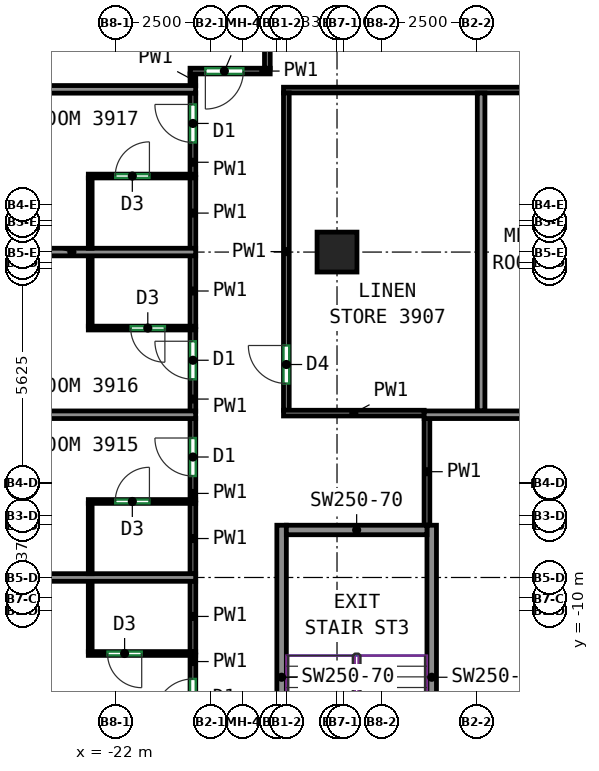
"""IFC4 building model, lengths in metres.
Left out: names, types, materials, properties, quantities, classifications, styles, units other than length and angle.
Written with IfcOpenShell. Run it as: python <this file> out.ifc"""

import sys

from ifc_helpers import new_model, si_unit, direction, frame, frame_2d, origin, origin_2d, place, context, subcontext, project, spatial, rectangle, extrude, source, transform, mapped, element, fill, save


model = new_model("IFC4")
c1 = context("Model", 3, precision=1e-05, world=origin(), true_north=direction((0.0, 1.0)))
c2 = subcontext(c1, "Body", "Model", "MODEL_VIEW")
j1 = project(units=[si_unit("LENGTHUNIT", "METRE"), si_unit("PLANEANGLEUNIT", "RADIAN")], contexts=[c1])
p1 = place(None, origin())
s1 = spatial("IfcSite", under=j1, at=p1, CompositionType="ELEMENT")
p2 = place(p1, origin())
s2 = spatial("IfcBuilding", under=s1, at=p2, CompositionType="ELEMENT")
p3 = place(p2, frame((0.0, 0.0, 168.5)))
s3 = spatial("IfcBuildingStorey", under=s2, at=p3, CompositionType="ELEMENT", Elevation=168.5)
m1 = source(origin(), c2, "Body", "SweptSolid", [
    extrude(rectangle(XDim=1.05, YDim=1.05, at=origin_2d()), origin(), (0.0, 0.0, 1.0), 3.12),
])
p4 = place(p3, frame((-16.167, -0.562, 0.0), z_axis=(0.0, 0.0, 1.0), x_axis=(1.0, 0.0, 0.0)))
e1 = element("IfcColumn", 1, at=p4, inside=s3, PredefinedType="COLUMN", context=c2, shape_type="MappedRepresentation", body=[
    mapped(m1, transform((0.0, 0.0, 0.0))),
])
m2 = source(origin(), c2, "Body", "SweptSolid", [
    extrude(rectangle(XDim=8.0, YDim=0.25, at=frame_2d((4.0, 0.0))), origin(), (0.0, 0.0, 1.0), 3.12),
])
for number, where, z_axis, x_axis in (
    (2, (-17.625, -15.75, 0.0), (0.0, 0.0, 1.0), (0.0, 1.0, 0.0)),
    (3, (-13.675, -15.75, 0.0), (0.0, 0.0, 1.0), (0.0, 1.0, 0.0)),
):
    element("IfcWall", number, at=place(p3, frame(where, z_axis=z_axis, x_axis=x_axis)), inside=s3, PredefinedType="SHEAR", context=c2, shape_type="MappedRepresentation", body=[
        mapped(m2, transform((0.0, 0.0, 0.0))),
    ])
m3 = source(origin(), c2, "Body", "SweptSolid", [
    extrude(rectangle(XDim=3.7, YDim=0.25, at=frame_2d((1.85, 0.0))), origin(), (0.0, 0.0, 1.0), 3.12),
])
p5 = place(p3, frame((-17.5, -7.875, 0.0), z_axis=(0.0, 0.0, 1.0), x_axis=(1.0, 0.0, 0.0)))
e4 = element("IfcWall", 4, at=p5, inside=s3, PredefinedType="SHEAR", context=c2, shape_type="MappedRepresentation", body=[
    mapped(m3, transform((0.0, 0.0, 0.0))),
])
p6 = place(p3, frame((-19.959, -13.316, 0.0), z_axis=(0.0, 0.0, 1.0), x_axis=(0.0, 1.0, 0.0)))
e5 = element("IfcWall", 5, at=p6, inside=s3, PredefinedType="PARTITIONING", context=c2, shape_type="SweptSolid", body=[
    extrude(rectangle(XDim=2.151, YDim=0.15, at=frame_2d((1.075, 0.0))), origin(), (0.0, 0.0, 1.0), 3.12),
])
p7 = place(p6, frame((0.522, 0.0, 0.0)))
e6 = element("IfcOpeningElement", 6, at=p7, cuts=e5, PredefinedType="OPENING", context=c2, shape_type="SweptSolid", body=[
    extrude(rectangle(XDim=1.0, YDim=2.1, at=frame_2d((0.5, 1.05))), frame((0.0, 0.085, 0.0), z_axis=(0.0, -1.0, 0.0), x_axis=(1.0, 0.0, 0.0)), (0.0, 0.0, 1.0), 0.17),
])
p8 = place(p3, frame((-19.959, -11.085, 0.0), z_axis=(0.0, 0.0, 1.0), x_axis=(0.0, 1.0, 0.0)))
e7 = element("IfcWall", 7, at=p8, inside=s3, PredefinedType="PARTITIONING", context=c2, shape_type="SweptSolid", body=[
    extrude(rectangle(XDim=1.87, YDim=0.15, at=frame_2d((0.935, 0.0))), origin(), (0.0, 0.0, 1.0), 3.12),
])
p9 = place(p3, frame((-19.959, -7.085, 0.0), z_axis=(0.0, 0.0, 1.0), x_axis=(0.0, 1.0, 0.0)))
e8 = element("IfcWall", 8, at=p9, inside=s3, PredefinedType="PARTITIONING", context=c2, shape_type="SweptSolid", body=[
    extrude(rectangle(XDim=2.152, YDim=0.15, at=frame_2d((1.076, 0.0))), origin(), (0.0, 0.0, 1.0), 3.12),
])
p10 = place(p9, frame((0.63, 0.0, 0.0)))
e9 = element("IfcOpeningElement", 9, at=p10, cuts=e8, PredefinedType="OPENING", context=c2, shape_type="SweptSolid", body=[
    extrude(rectangle(XDim=1.0, YDim=2.1, at=frame_2d((0.5, 1.05))), frame((0.0, 0.085, 0.0), z_axis=(0.0, -1.0, 0.0), x_axis=(1.0, 0.0, 0.0)), (0.0, 0.0, 1.0), 0.17),
])
p11 = place(p3, frame((-19.959, -9.035, 0.0), z_axis=(0.0, 0.0, 1.0), x_axis=(0.0, 1.0, 0.0)))
e10 = element("IfcWall", 10, at=p11, inside=s3, PredefinedType="PARTITIONING", context=c2, shape_type="SweptSolid", body=[
    extrude(rectangle(XDim=1.87, YDim=0.15, at=frame_2d((0.935, 0.0))), origin(), (0.0, 0.0, 1.0), 3.12),
])
p12 = place(p3, frame((-19.959, -4.753, 0.0), z_axis=(0.0, 0.0, 1.0), x_axis=(0.0, 1.0, 0.0)))
e11 = element("IfcWall", 11, at=p12, inside=s3, PredefinedType="PARTITIONING", context=c2, shape_type="SweptSolid", body=[
    extrude(rectangle(XDim=2.151, YDim=0.15, at=frame_2d((1.075, 0.0))), origin(), (0.0, 0.0, 1.0), 3.12),
])
p13 = place(p12, frame((0.844, 0.0, 0.0)))
e12 = element("IfcOpeningElement", 12, at=p13, cuts=e11, PredefinedType="OPENING", context=c2, shape_type="SweptSolid", body=[
    extrude(rectangle(XDim=1.0, YDim=2.1, at=frame_2d((0.5, 1.05))), frame((0.0, 0.085, 0.0), z_axis=(0.0, -1.0, 0.0), x_axis=(1.0, 0.0, 0.0)), (0.0, 0.0, 1.0), 0.17),
])
p14 = place(p3, frame((-19.959, -2.522, 0.0), z_axis=(0.0, 0.0, 1.0), x_axis=(0.0, 1.0, 0.0)))
e13 = element("IfcWall", 13, at=p14, inside=s3, PredefinedType="PARTITIONING", context=c2, shape_type="SweptSolid", body=[
    extrude(rectangle(XDim=1.87, YDim=0.15, at=frame_2d((0.935, 0.0))), origin(), (0.0, 0.0, 1.0), 3.12),
])
p15 = place(p3, frame((-19.959, 1.478, 0.0), z_axis=(0.0, 0.0, 1.0), x_axis=(0.0, 1.0, 0.0)))
e14 = element("IfcWall", 14, at=p15, inside=s3, PredefinedType="PARTITIONING", context=c2, shape_type="SweptSolid", body=[
    extrude(rectangle(XDim=2.151, YDim=0.15, at=frame_2d((1.075, 0.0))), origin(), (0.0, 0.0, 1.0), 3.12),
])
p16 = place(p15, frame((0.844, 0.0, 0.0)))
e15 = element("IfcOpeningElement", 15, at=p16, cuts=e14, PredefinedType="OPENING", context=c2, shape_type="SweptSolid", body=[
    extrude(rectangle(XDim=1.0, YDim=2.1, at=frame_2d((0.5, 1.05))), frame((0.0, 0.085, 0.0), z_axis=(0.0, -1.0, 0.0), x_axis=(1.0, 0.0, 0.0)), (0.0, 0.0, 1.0), 0.17),
])
p17 = place(p3, frame((-19.959, -0.472, 0.0), z_axis=(0.0, 0.0, 1.0), x_axis=(0.0, 1.0, 0.0)))
e16 = element("IfcWall", 16, at=p17, inside=s3, PredefinedType="PARTITIONING", context=c2, shape_type="SweptSolid", body=[
    extrude(rectangle(XDim=1.87, YDim=0.15, at=frame_2d((0.935, 0.0))), origin(), (0.0, 0.0, 1.0), 3.12),
])
p18 = place(p3, frame((-19.959, 3.809, 0.0), z_axis=(0.0, 0.0, 1.0), x_axis=(0.0, 1.0, 0.0)))
e17 = element("IfcWall", 17, at=p18, inside=s3, PredefinedType="PARTITIONING", context=c2, shape_type="SweptSolid", body=[
    extrude(rectangle(XDim=0.316, YDim=0.15, at=frame_2d((0.158, 0.0))), origin(), (0.0, 0.0, 1.0), 3.12),
])
p19 = place(p3, frame((-17.925, 4.2, 0.0), z_axis=(0.0, 0.0, 1.0), x_axis=(-1.0, 0.0, 0.0)))
e18 = element("IfcWall", 18, at=p19, inside=s3, PredefinedType="PARTITIONING", context=c2, shape_type="SweptSolid", body=[
    extrude(rectangle(XDim=2.109, YDim=0.15, at=frame_2d((1.054, 0.0))), origin(), (0.0, 0.0, 1.0), 3.12),
])
p20 = place(p19, frame((0.706, 0.0, 0.0)))
e19 = element("IfcOpeningElement", 19, at=p20, cuts=e18, PredefinedType="OPENING", context=c2, shape_type="SweptSolid", body=[
    extrude(rectangle(XDim=1.0, YDim=2.1, at=frame_2d((0.5, 1.05))), frame((0.0, 0.085, 0.0), z_axis=(0.0, -1.0, 0.0), x_axis=(1.0, 0.0, 0.0)), (0.0, 0.0, 1.0), 0.17),
])
p21 = place(p3, frame((-18.0, 4.275, 0.0), z_axis=(0.0, 0.0, 1.0), x_axis=(0.0, 1.0, 0.0)))
e20 = element("IfcWall", 20, at=p21, inside=s3, PredefinedType="PARTITIONING", context=c2, shape_type="SweptSolid", body=[
    extrude(rectangle(XDim=1.685, YDim=0.15, at=frame_2d((0.843, 0.0))), origin(), (0.0, 0.0, 1.0), 3.12),
])
p22 = place(p3, frame((-17.575, 3.7, 0.0), z_axis=(0.0, 0.0, 1.0), x_axis=(1.0, 0.0, 0.0)))
e21 = element("IfcWall", 21, at=p22, inside=s3, PredefinedType="PARTITIONING", context=c2, shape_type="SweptSolid", body=[
    extrude(rectangle(XDim=33.85, YDim=0.15, at=frame_2d((16.925, 0.0))), origin(), (0.0, 0.0, 1.0), 3.12),
])
p23 = place(p22, frame((6.596, 0.0, 0.0)))
e22 = element("IfcOpeningElement", 22, at=p23, cuts=e21, PredefinedType="OPENING", context=c2, shape_type="SweptSolid", body=[
    extrude(rectangle(XDim=0.9, YDim=2.1, at=frame_2d((0.45, 1.05))), frame((0.0, 0.085, 0.0), z_axis=(0.0, -1.0, 0.0), x_axis=(1.0, 0.0, 0.0)), (0.0, 0.0, 1.0), 0.17),
])
p24 = place(p22, frame((10.082, 0.0, 0.0)))
e23 = element("IfcOpeningElement", 23, at=p24, cuts=e21, PredefinedType="OPENING", context=c2, shape_type="SweptSolid", body=[
    extrude(rectangle(XDim=0.9, YDim=2.1, at=frame_2d((0.45, 1.05))), frame((0.0, 0.085, 0.0), z_axis=(0.0, -1.0, 0.0), x_axis=(1.0, 0.0, 0.0)), (0.0, 0.0, 1.0), 0.17),
])
p25 = place(p22, frame((21.767, 0.0, 0.0)))
e24 = element("IfcOpeningElement", 24, at=p25, cuts=e21, PredefinedType="OPENING", context=c2, shape_type="SweptSolid", body=[
    extrude(rectangle(XDim=0.9, YDim=2.1, at=frame_2d((0.45, 1.05))), frame((0.0, 0.085, 0.0), z_axis=(0.0, -1.0, 0.0), x_axis=(1.0, 0.0, 0.0)), (0.0, 0.0, 1.0), 0.17),
])
p26 = place(p22, frame((29.649, 0.0, 0.0)))
e25 = element("IfcOpeningElement", 25, at=p26, cuts=e21, PredefinedType="OPENING", context=c2, shape_type="SweptSolid", body=[
    extrude(rectangle(XDim=0.9, YDim=2.1, at=frame_2d((0.45, 1.05))), frame((0.0, 0.085, 0.0), z_axis=(0.0, -1.0, 0.0), x_axis=(1.0, 0.0, 0.0)), (0.0, 0.0, 1.0), 0.17),
])
p27 = place(p3, frame((-17.5, -4.725, 0.0), z_axis=(0.0, 0.0, 1.0), x_axis=(0.0, 1.0, 0.0)))
e26 = element("IfcWall", 26, at=p27, inside=s3, PredefinedType="PARTITIONING", context=c2, shape_type="SweptSolid", body=[
    extrude(rectangle(XDim=8.35, YDim=0.15, at=frame_2d((4.175, 0.0))), origin(), (0.0, 0.0, 1.0), 3.12),
])
p28 = place(p27, frame((0.704, 0.0, 0.0)))
e27 = element("IfcOpeningElement", 27, at=p28, cuts=e26, PredefinedType="OPENING", context=c2, shape_type="SweptSolid", body=[
    extrude(rectangle(XDim=1.0, YDim=2.1, at=frame_2d((0.5, 1.05))), frame((0.0, 0.085, 0.0), z_axis=(0.0, -1.0, 0.0), x_axis=(1.0, 0.0, 0.0)), (0.0, 0.0, 1.0), 0.17),
])
p29 = place(p3, frame((-17.575, -4.8, 0.0), z_axis=(0.0, 0.0, 1.0), x_axis=(1.0, 0.0, 0.0)))
e28 = element("IfcWall", 28, at=p29, inside=s3, PredefinedType="PARTITIONING", context=c2, shape_type="SweptSolid", body=[
    extrude(rectangle(XDim=3.702, YDim=0.15, at=frame_2d((1.851, 0.0))), origin(), (0.0, 0.0, 1.0), 3.12),
])
p30 = place(p3, frame((-13.8, -7.75, 0.0), z_axis=(0.0, 0.0, 1.0), x_axis=(0.0, 1.0, 0.0)))
e29 = element("IfcWall", 29, at=p30, inside=s3, PredefinedType="PARTITIONING", context=c2, shape_type="SweptSolid", body=[
    extrude(rectangle(XDim=2.817, YDim=0.15, at=frame_2d((1.408, 0.0))), origin(), (0.0, 0.0, 1.0), 3.12),
])
p31 = place(p3, frame((-19.886, -11.125, 0.0), z_axis=(0.0, 0.0, 1.0), x_axis=(-1.0, 0.0, 0.0)))
e30 = element("IfcWall", 30, at=p31, inside=s3, PredefinedType="PARTITIONING", context=c2, shape_type="SweptSolid", body=[
    extrude(rectangle(XDim=2.825, YDim=0.1, at=frame_2d((1.413, 0.0))), origin(), (0.0, 0.0, 1.0), 3.12),
])
p32 = place(p31, frame((1.42, 0.0, 0.0)))
e31 = element("IfcOpeningElement", 31, at=p32, cuts=e30, PredefinedType="OPENING", context=c2, shape_type="SweptSolid", body=[
    extrude(rectangle(XDim=0.9, YDim=2.1, at=frame_2d((0.45, 1.05))), frame((0.0, 0.06, 0.0), z_axis=(0.0, -1.0, 0.0), x_axis=(1.0, 0.0, 0.0)), (0.0, 0.0, 1.0), 0.12),
])
p33 = place(p3, frame((-22.661, -11.075, 0.0), z_axis=(0.0, 0.0, 1.0), x_axis=(0.0, 1.0, 0.0)))
e32 = element("IfcWall", 32, at=p33, inside=s3, PredefinedType="PARTITIONING", context=c2, shape_type="SweptSolid", body=[
    extrude(rectangle(XDim=1.85, YDim=0.1, at=frame_2d((0.925, 0.0))), origin(), (0.0, 0.0, 1.0), 3.12),
])
p34 = place(p3, frame((-26.4, -9.125, 0.0), z_axis=(0.0, 0.0, 1.0), x_axis=(1.0, 0.0, 0.0)))
e33 = element("IfcWall", 33, at=p34, inside=s3, PredefinedType="PARTITIONING", context=c2, shape_type="SweptSolid", body=[
    extrude(rectangle(XDim=6.514, YDim=0.2, at=frame_2d((3.257, 0.0))), origin(), (0.0, 0.0, 1.0), 3.12),
])
p35 = place(p3, frame((-22.711, -7.125, 0.0), z_axis=(0.0, 0.0, 1.0), x_axis=(1.0, 0.0, 0.0)))
e34 = element("IfcWall", 34, at=p35, inside=s3, PredefinedType="PARTITIONING", context=c2, shape_type="SweptSolid", body=[
    extrude(rectangle(XDim=2.825, YDim=0.1, at=frame_2d((1.413, 0.0))), origin(), (0.0, 0.0, 1.0), 3.12),
])
p36 = place(p35, frame((0.708, 0.0, 0.0)))
e35 = element("IfcOpeningElement", 35, at=p36, cuts=e34, PredefinedType="OPENING", context=c2, shape_type="SweptSolid", body=[
    extrude(rectangle(XDim=0.9, YDim=2.1, at=frame_2d((0.45, 1.05))), frame((0.0, 0.06, 0.0), z_axis=(0.0, -1.0, 0.0), x_axis=(1.0, 0.0, 0.0)), (0.0, 0.0, 1.0), 0.12),
])
p37 = place(p3, frame((-22.661, -9.025, 0.0), z_axis=(0.0, 0.0, 1.0), x_axis=(0.0, 1.0, 0.0)))
e36 = element("IfcWall", 36, at=p37, inside=s3, PredefinedType="PARTITIONING", context=c2, shape_type="SweptSolid", body=[
    extrude(rectangle(XDim=1.85, YDim=0.1, at=frame_2d((0.925, 0.0))), origin(), (0.0, 0.0, 1.0), 3.12),
])
p38 = place(p3, frame((-27.0, -4.843, 0.0), z_axis=(0.0, 0.0, 1.0), x_axis=(1.0, 0.0, 0.0)))
e37 = element("IfcWall", 37, at=p38, inside=s3, PredefinedType="PARTITIONING", context=c2, shape_type="SweptSolid", body=[
    extrude(rectangle(XDim=7.114, YDim=0.2, at=frame_2d((3.557, 0.0))), origin(), (0.0, 0.0, 1.0), 3.12),
])
p39 = place(p3, frame((-19.886, -2.562, 0.0), z_axis=(0.0, 0.0, 1.0), x_axis=(-1.0, 0.0, 0.0)))
e38 = element("IfcWall", 38, at=p39, inside=s3, PredefinedType="PARTITIONING", context=c2, shape_type="SweptSolid", body=[
    extrude(rectangle(XDim=2.825, YDim=0.1, at=frame_2d((1.413, 0.0))), origin(), (0.0, 0.0, 1.0), 3.12),
])
p40 = place(p39, frame((0.81, 0.0, 0.0)))
e39 = element("IfcOpeningElement", 39, at=p40, cuts=e38, PredefinedType="OPENING", context=c2, shape_type="SweptSolid", body=[
    extrude(rectangle(XDim=0.9, YDim=2.1, at=frame_2d((0.45, 1.05))), frame((0.0, 0.06, 0.0), z_axis=(0.0, -1.0, 0.0), x_axis=(1.0, 0.0, 0.0)), (0.0, 0.0, 1.0), 0.12),
])
p41 = place(p3, frame((-22.661, -2.512, 0.0), z_axis=(0.0, 0.0, 1.0), x_axis=(0.0, 1.0, 0.0)))
e40 = element("IfcWall", 40, at=p41, inside=s3, PredefinedType="PARTITIONING", context=c2, shape_type="SweptSolid", body=[
    extrude(rectangle(XDim=1.85, YDim=0.1, at=frame_2d((0.925, 0.0))), origin(), (0.0, 0.0, 1.0), 3.12),
])
p42 = place(p3, frame((-26.4, -0.562, 0.0), z_axis=(0.0, 0.0, 1.0), x_axis=(1.0, 0.0, 0.0)))
e41 = element("IfcWall", 41, at=p42, inside=s3, PredefinedType="PARTITIONING", context=c2, shape_type="SweptSolid", body=[
    extrude(rectangle(XDim=6.514, YDim=0.2, at=frame_2d((3.257, 0.0))), origin(), (0.0, 0.0, 1.0), 2.52),
])
p43 = place(p3, frame((-22.711, 1.438, 0.0), z_axis=(0.0, 0.0, 1.0), x_axis=(1.0, 0.0, 0.0)))
e42 = element("IfcWall", 42, at=p43, inside=s3, PredefinedType="PARTITIONING", context=c2, shape_type="SweptSolid", body=[
    extrude(rectangle(XDim=2.825, YDim=0.1, at=frame_2d((1.413, 0.0))), origin(), (0.0, 0.0, 1.0), 3.12),
])
p44 = place(p43, frame((0.708, 0.0, 0.0)))
e43 = element("IfcOpeningElement", 43, at=p44, cuts=e42, PredefinedType="OPENING", context=c2, shape_type="SweptSolid", body=[
    extrude(rectangle(XDim=0.9, YDim=2.1, at=frame_2d((0.45, 1.05))), frame((0.0, 0.06, 0.0), z_axis=(0.0, -1.0, 0.0), x_axis=(1.0, 0.0, 0.0)), (0.0, 0.0, 1.0), 0.12),
])
p45 = place(p3, frame((-22.661, -0.462, 0.0), z_axis=(0.0, 0.0, 1.0), x_axis=(0.0, 1.0, 0.0)))
e44 = element("IfcWall", 44, at=p45, inside=s3, PredefinedType="PARTITIONING", context=c2, shape_type="SweptSolid", body=[
    extrude(rectangle(XDim=1.85, YDim=0.1, at=frame_2d((0.925, 0.0))), origin(), (0.0, 0.0, 1.0), 3.12),
])
p46 = place(p3, frame((-27.0, 3.719, 0.0), z_axis=(0.0, 0.0, 1.0), x_axis=(1.0, 0.0, 0.0)))
e45 = element("IfcWall", 45, at=p46, inside=s3, PredefinedType="PARTITIONING", context=c2, shape_type="SweptSolid", body=[
    extrude(rectangle(XDim=7.114, YDim=0.2, at=frame_2d((3.557, 0.0))), origin(), (0.0, 0.0, 1.0), 3.12),
])
p47 = place(p3, frame((-12.375, -4.743, 0.0), z_axis=(0.0, 0.0, 1.0), x_axis=(0.0, 1.0, 0.0)))
e46 = element("IfcWall", 46, at=p47, inside=s3, PredefinedType="PARTITIONING", context=c2, shape_type="SweptSolid", body=[
    extrude(rectangle(XDim=8.366, YDim=0.2, at=frame_2d((4.183, 0.0))), origin(), (0.0, 0.0, 1.0), 3.12),
])
p48 = place(p3, frame((-13.873, -4.843, 0.0), z_axis=(0.0, 0.0, 1.0), x_axis=(1.0, 0.0, 0.0)))
e47 = element("IfcWall", 47, at=p48, inside=s3, PredefinedType="PARTITIONING", context=c2, shape_type="SweptSolid", body=[
    extrude(rectangle(XDim=30.146, YDim=0.2, at=frame_2d((15.073, 0.0))), origin(), (0.0, 0.0, 1.0), 3.12),
])
p49 = place(p7, origin())
e48 = element("IfcDoor", 48, at=p49, inside=s3, OperationType="SINGLE_SWING_LEFT", PredefinedType="DOOR", context=c2, shape_type="SweptSolid", body=[
    extrude(rectangle(XDim=1.0, YDim=2.1, at=frame_2d((0.5, 1.05))), frame((0.0, 0.025, 0.0), z_axis=(0.0, -1.0, 0.0), x_axis=(1.0, 0.0, 0.0)), (0.0, 0.0, 1.0), 0.05),
])
fill(e6, e48)
p50 = place(p32, origin())
e49 = element("IfcDoor", 49, at=p50, inside=s3, OperationType="SINGLE_SWING_LEFT", PredefinedType="DOOR", context=c2, shape_type="SweptSolid", body=[
    extrude(rectangle(XDim=0.9, YDim=2.1, at=frame_2d((0.45, 1.05))), frame((0.0, 0.025, 0.0), z_axis=(0.0, -1.0, 0.0), x_axis=(1.0, 0.0, 0.0)), (0.0, 0.0, 1.0), 0.05),
])
fill(e31, e49)
p51 = place(p36, origin())
e50 = element("IfcDoor", 50, at=p51, inside=s3, OperationType="SINGLE_SWING_RIGHT", PredefinedType="DOOR", context=c2, shape_type="SweptSolid", body=[
    extrude(rectangle(XDim=0.9, YDim=2.1, at=frame_2d((0.45, 1.05))), frame((0.0, 0.025, 0.0), z_axis=(0.0, -1.0, 0.0), x_axis=(1.0, 0.0, 0.0)), (0.0, 0.0, 1.0), 0.05),
])
fill(e35, e50)
p52 = place(p10, origin())
e51 = element("IfcDoor", 51, at=p52, inside=s3, OperationType="SINGLE_SWING_RIGHT", PredefinedType="DOOR", context=c2, shape_type="SweptSolid", body=[
    extrude(rectangle(XDim=1.0, YDim=2.1, at=frame_2d((0.5, 1.05))), frame((0.0, 0.025, 0.0), z_axis=(0.0, -1.0, 0.0), x_axis=(1.0, 0.0, 0.0)), (0.0, 0.0, 1.0), 0.05),
])
fill(e9, e51)
p53 = place(p28, origin())
e52 = element("IfcDoor", 52, at=p53, inside=s3, OperationType="SINGLE_SWING_RIGHT", PredefinedType="DOOR", context=c2, shape_type="SweptSolid", body=[
    extrude(rectangle(XDim=1.0, YDim=2.1, at=frame_2d((0.5, 1.05))), frame((0.0, 0.025, 0.0), z_axis=(0.0, -1.0, 0.0), x_axis=(1.0, 0.0, 0.0)), (0.0, 0.0, 1.0), 0.05),
])
fill(e27, e52)
p54 = place(p13, origin())
e53 = element("IfcDoor", 53, at=p54, inside=s3, OperationType="SINGLE_SWING_RIGHT", PredefinedType="DOOR", context=c2, shape_type="SweptSolid", body=[
    extrude(rectangle(XDim=1.0, YDim=2.1, at=frame_2d((0.5, 1.05))), frame((0.0, 0.025, 0.0), z_axis=(0.0, -1.0, 0.0), x_axis=(1.0, 0.0, 0.0)), (0.0, 0.0, 1.0), 0.05),
])
fill(e12, e53)
p55 = place(p40, origin())
e54 = element("IfcDoor", 54, at=p55, inside=s3, OperationType="SINGLE_SWING_LEFT", PredefinedType="DOOR", context=c2, shape_type="SweptSolid", body=[
    extrude(rectangle(XDim=0.9, YDim=2.1, at=frame_2d((0.45, 1.05))), frame((0.0, 0.025, 0.0), z_axis=(0.0, -1.0, 0.0), x_axis=(1.0, 0.0, 0.0)), (0.0, 0.0, 1.0), 0.05),
])
fill(e39, e54)
p56 = place(p44, origin())
e55 = element("IfcDoor", 55, at=p56, inside=s3, OperationType="SINGLE_SWING_RIGHT", PredefinedType="DOOR", context=c2, shape_type="SweptSolid", body=[
    extrude(rectangle(XDim=0.9, YDim=2.1, at=frame_2d((0.45, 1.05))), frame((0.0, 0.025, 0.0), z_axis=(0.0, -1.0, 0.0), x_axis=(1.0, 0.0, 0.0)), (0.0, 0.0, 1.0), 0.05),
])
fill(e43, e55)
p57 = place(p16, origin())
e56 = element("IfcDoor", 56, at=p57, inside=s3, OperationType="SINGLE_SWING_RIGHT", PredefinedType="DOOR", context=c2, shape_type="SweptSolid", body=[
    extrude(rectangle(XDim=1.0, YDim=2.1, at=frame_2d((0.5, 1.05))), frame((0.0, 0.025, 0.0), z_axis=(0.0, -1.0, 0.0), x_axis=(1.0, 0.0, 0.0)), (0.0, 0.0, 1.0), 0.05),
])
fill(e15, e56)
p58 = place(p20, origin())
e57 = element("IfcDoor", 57, at=p58, inside=s3, OperationType="SINGLE_SWING_RIGHT", PredefinedType="DOOR", context=c2, shape_type="SweptSolid", body=[
    extrude(rectangle(XDim=1.0, YDim=2.1, at=frame_2d((0.5, 1.05))), frame((0.0, 0.025, 0.0), z_axis=(0.0, -1.0, 0.0), x_axis=(1.0, 0.0, 0.0)), (0.0, 0.0, 1.0), 0.05),
])
fill(e19, e57)
save(model, sys.argv[1])
